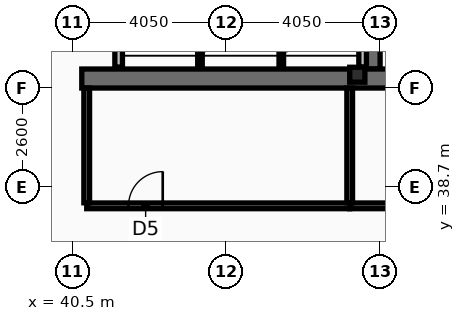
"""IFC4 building model, lengths in metres.
Left out: names, types, materials, properties, quantities, classifications, styles, units other than length and angle.
Written with IfcOpenShell. Run it as: python <this file> out.ifc"""

import sys

from ifc_helpers import new_model, si_unit, direction, frame, frame_2d, origin, origin_2d, place, context, subcontext, project, spatial, rectangle, i_section, extrude, element, fill, save


model = new_model("IFC4")
c1 = context("Model", 3, precision=1e-05, world=origin(), true_north=direction((0.0, 1.0)))
c2 = subcontext(c1, "Body", "Model", "MODEL_VIEW")
j1 = project(units=[si_unit("LENGTHUNIT", "METRE"), si_unit("PLANEANGLEUNIT", "RADIAN")], contexts=[c1])
p1 = place(None, origin())
s1 = spatial("IfcSite", under=j1, at=p1, CompositionType="ELEMENT")
p2 = place(p1, origin())
s2 = spatial("IfcBuilding", under=s1, at=p2, CompositionType="ELEMENT")
p3 = place(p2, frame((0.0, 0.0, 332.6)))
s3 = spatial("IfcBuildingStorey", under=s2, at=p3, CompositionType="ELEMENT", Elevation=332.6)
p4 = place(p3, frame((48.4, 41.8, 0.0), z_axis=(0.0, 0.0, 1.0), x_axis=(0.0, 1.0, 0.0)))
e1 = element("IfcWall", 1, at=p4, inside=s3, PredefinedType="SHEAR", context=c2, shape_type="SweptSolid", body=[
    extrude(rectangle(XDim=11.4, YDim=0.4, at=frame_2d((5.7, 0.0))), origin(), (0.0, 0.0, 1.0), 3.44),
])
p5 = place(p3, frame((52.05, 41.55, 0.0), z_axis=(0.0, 0.0, 1.0), x_axis=(-1.0, 0.0, 0.0)))
e2 = element("IfcWall", 2, at=p5, inside=s3, PredefinedType="SHEAR", context=c2, shape_type="SweptSolid", body=[
    extrude(rectangle(XDim=11.3, YDim=0.5, at=frame_2d((5.65, 0.0))), origin(), (0.0, 0.0, 1.0), 3.44),
])
p6 = place(p3, frame((48.0, 41.65, 0.0), z_axis=(0.0, 0.0, 1.0), x_axis=(1.0, 0.0, 0.0)))
e3 = element("IfcColumn", 3, at=p6, inside=s3, PredefinedType="COLUMN", context=c2, shape_type="SweptSolid", body=[
    extrude(i_section(OverallWidth=0.399, OverallDepth=0.393, WebThickness=0.023, FlangeThickness=0.037, at=origin_2d()), origin(), (0.0, 0.0, 1.0), 3.6),
])
for number, where, z_axis, x_axis in (
    (4, (41.72, 41.85, 0.0), (0.0, 0.0, 1.0), (0.0, 1.0, 0.0)),
    (5, (48.14, 41.85, 0.0), (0.0, 0.0, 1.0), (0.0, 1.0, 0.0)),
):
    element("IfcWall", number, at=place(p3, frame(where, z_axis=z_axis, x_axis=x_axis)), inside=s3, PredefinedType="PARTITIONING", context=c2, shape_type="SweptSolid", body=[
        extrude(rectangle(XDim=2.4, YDim=0.2, at=frame_2d((1.2, 0.0))), origin(), (0.0, 0.0, 1.0), 3.44),
    ])
for number, where, z_axis, x_axis in (
    (6, (43.86, 41.85, 0.0), (0.0, 0.0, 1.0), (0.0, 1.0, 0.0)),
    (7, (46.0, 41.85, 0.0), (0.0, 0.0, 1.0), (0.0, 1.0, 0.0)),
):
    element("IfcWall", number, at=place(p3, frame(where, z_axis=z_axis, x_axis=x_axis)), inside=s3, PredefinedType="PARTITIONING", context=c2, shape_type="SweptSolid", body=[
        extrude(rectangle(XDim=2.4, YDim=0.12, at=frame_2d((1.2, 0.0))), origin(), (0.0, 0.0, 1.0), 3.44),
    ])
p7 = place(p3, frame((40.88, 38.2, 0.0), z_axis=(0.0, 0.0, 1.0), x_axis=(1.0, 0.0, 0.0)))
e8 = element("IfcWall", 8, at=p7, inside=s3, PredefinedType="PARTITIONING", context=c2, shape_type="SweptSolid", body=[
    extrude(rectangle(XDim=6.92, YDim=0.15, at=frame_2d((3.46, 0.0))), origin(), (0.0, 0.0, 1.0), 2.83),
])
p8 = place(p7, frame((1.1, 0.0, 0.0)))
e9 = element("IfcOpeningElement", 9, at=p8, cuts=e8, PredefinedType="OPENING", context=c2, shape_type="SweptSolid", body=[
    extrude(rectangle(XDim=0.9, YDim=2.05, at=frame_2d((0.45, 1.025))), frame((0.0, 0.085, 0.0), z_axis=(0.0, -1.0, 0.0), x_axis=(1.0, 0.0, 0.0)), (0.0, 0.0, 1.0), 0.17),
])
p9 = place(p3, frame((47.8, 38.2, 0.0), z_axis=(0.0, 0.0, 1.0), x_axis=(1.0, 0.0, 0.0)))
e10 = element("IfcWall", 10, at=p9, inside=s3, PredefinedType="PARTITIONING", context=c2, shape_type="SweptSolid", body=[
    extrude(rectangle(XDim=4.15, YDim=0.15, at=frame_2d((2.075, 0.0))), origin(), (0.0, 0.0, 1.0), 2.83),
])
p10 = place(p9, frame((1.1, 0.0, 0.0)))
e11 = element("IfcOpeningElement", 11, at=p10, cuts=e10, PredefinedType="OPENING", context=c2, shape_type="SweptSolid", body=[
    extrude(rectangle(XDim=1.0, YDim=2.05, at=frame_2d((0.5, 1.025))), frame((0.0, 0.085, 0.0), z_axis=(0.0, -1.0, 0.0), x_axis=(1.0, 0.0, 0.0)), (0.0, 0.0, 1.0), 0.17),
])
p11 = place(p3, frame((40.88, 38.28, 0.0), z_axis=(0.0, 0.0, 1.0), x_axis=(0.0, 1.0, 0.0)))
e12 = element("IfcWall", 12, at=p11, inside=s3, PredefinedType="PARTITIONING", context=c2, shape_type="SweptSolid", body=[
    extrude(rectangle(XDim=3.02, YDim=0.15, at=frame_2d((1.51, 0.0))), origin(), (0.0, 0.0, 1.0), 3.44),
])
p12 = place(p3, frame((47.8, 38.28, 0.0), z_axis=(0.0, 0.0, 1.0), x_axis=(0.0, 1.0, 0.0)))
e13 = element("IfcWall", 13, at=p12, inside=s3, PredefinedType="PARTITIONING", context=c2, shape_type="SweptSolid", body=[
    extrude(rectangle(XDim=3.02, YDim=0.15, at=frame_2d((1.51, 0.0))), origin(), (0.0, 0.0, 1.0), 2.83),
])
p13 = place(p8, origin())
e14 = element("IfcDoor", 14, at=p13, inside=s3, OperationType="SINGLE_SWING_RIGHT", PredefinedType="DOOR", context=c2, shape_type="SweptSolid", body=[
    extrude(rectangle(XDim=0.9, YDim=2.05, at=frame_2d((0.45, 1.025))), frame((0.0, 0.025, 0.0), z_axis=(0.0, -1.0, 0.0), x_axis=(1.0, 0.0, 0.0)), (0.0, 0.0, 1.0), 0.05),
])
fill(e9, e14)
save(model, sys.argv[1])
